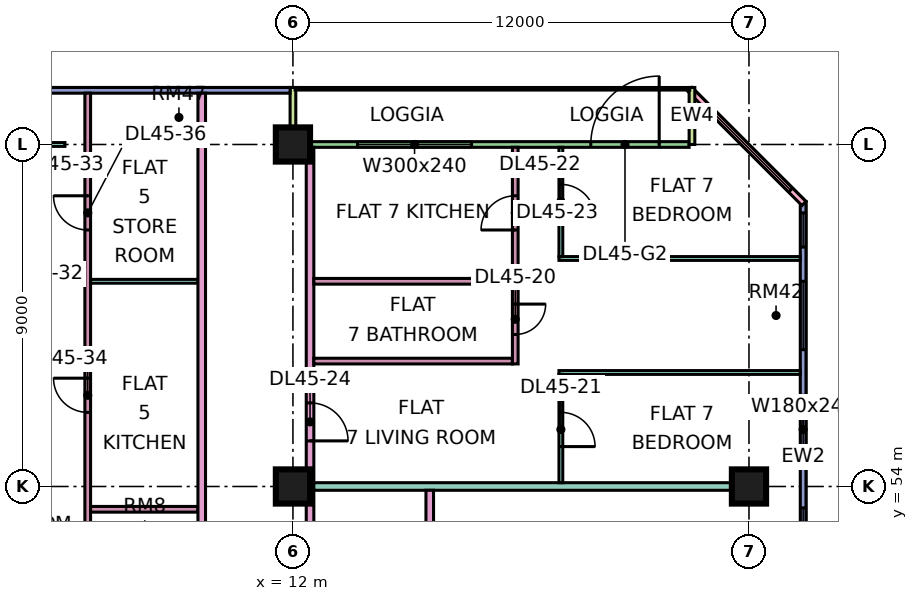
"""IFC4 building model, lengths in metres.
Left out: names, types, materials, properties, quantities, classifications, styles, units other than length and angle.
Written with IfcOpenShell. Run it as: python <this file> out.ifc"""

import sys

from ifc_helpers import new_model, si_unit, direction, frame, frame_2d, origin, origin_2d, place, context, subcontext, project, spatial, rectangle, extrude, element, fill, save


model = new_model("IFC4")
c1 = context("Model", 3, precision=1e-05, world=origin(), true_north=direction((0.0, 1.0)))
c2 = subcontext(c1, "Body", "Model", "MODEL_VIEW")
j1 = project(units=[si_unit("LENGTHUNIT", "METRE"), si_unit("PLANEANGLEUNIT", "RADIAN")], contexts=[c1])
p1 = place(None, origin())
s1 = spatial("IfcSite", under=j1, at=p1, CompositionType="ELEMENT")
p2 = place(p1, origin())
s2 = spatial("IfcBuilding", under=s1, at=p2, CompositionType="ELEMENT")
p3 = place(p2, frame((0.0, 0.0, 194.9)))
s3 = spatial("IfcBuildingStorey", under=s2, at=p3, CompositionType="ELEMENT", Elevation=194.9)
for number, where, z_axis, x_axis in (
    (1, (12.0, 54.0, 0.0), (0.0, 0.0, 1.0), (1.0, 0.0, 0.0)),
    (2, (12.0, 63.0, 0.0), (0.0, 0.0, 1.0), (1.0, 0.0, 0.0)),
    (3, (24.0, 54.0, 0.0), (0.0, 0.0, 1.0), (1.0, 0.0, 0.0)),
):
    element("IfcColumn", number, at=place(p3, frame(where, z_axis=z_axis, x_axis=x_axis)), inside=s3, PredefinedType="COLUMN", context=c2, shape_type="SweptSolid", body=[
        extrude(rectangle(XDim=0.9, YDim=0.9, at=origin_2d()), origin(), (0.0, 0.0, 1.0), 3.75),
    ])
p4 = place(p3, frame((25.425, 48.075, 0.0), z_axis=(0.0, 0.0, 1.0), x_axis=(0.0, 1.0, 0.0)))
e4 = element("IfcWall", 4, at=p4, inside=s3, PredefinedType="SOLIDWALL", context=c2, shape_type="SweptSolid", body=[
    extrude(rectangle(XDim=13.425, YDim=0.15, at=frame_2d((6.712, 0.0))), origin(), (0.0, 0.0, 1.0), 3.35),
])
p5 = place(p4, frame((0.562, 0.0, 0.45)))
e5 = element("IfcOpeningElement", 5, at=p5, cuts=e4, PredefinedType="OPENING", context=c2, shape_type="SweptSolid", body=[
    extrude(rectangle(XDim=4.8, YDim=2.4, at=frame_2d((2.4, 1.2))), frame((0.0, 0.085, 0.0), z_axis=(0.0, -1.0, 0.0), x_axis=(1.0, 0.0, 0.0)), (0.0, 0.0, 1.0), 0.17),
])
p6 = place(p4, frame((6.525, 0.0, 0.45)))
e6 = element("IfcOpeningElement", 6, at=p6, cuts=e4, PredefinedType="OPENING", context=c2, shape_type="SweptSolid", body=[
    extrude(rectangle(XDim=1.8, YDim=2.4, at=frame_2d((0.9, 1.2))), frame((0.0, 0.085, 0.0), z_axis=(0.0, -1.0, 0.0), x_axis=(1.0, 0.0, 0.0)), (0.0, 0.0, 1.0), 0.17),
])
p7 = place(p4, frame((9.525, 0.0, 0.45)))
e7 = element("IfcOpeningElement", 7, at=p7, cuts=e4, PredefinedType="OPENING", context=c2, shape_type="SweptSolid", body=[
    extrude(rectangle(XDim=1.8, YDim=2.4, at=frame_2d((0.9, 1.2))), frame((0.0, 0.085, 0.0), z_axis=(0.0, -1.0, 0.0), x_axis=(1.0, 0.0, 0.0)), (0.0, 0.0, 1.0), 0.17),
])
p8 = place(p4, frame((12.225, 0.0, 0.45)))
e8 = element("IfcOpeningElement", 8, at=p8, cuts=e4, PredefinedType="OPENING", context=c2, shape_type="SweptSolid", body=[
    extrude(rectangle(XDim=0.9, YDim=2.4, at=frame_2d((0.45, 1.2))), frame((0.0, 0.085, 0.0), z_axis=(0.0, -1.0, 0.0), x_axis=(1.0, 0.0, 0.0)), (0.0, 0.0, 1.0), 0.17),
])
p9 = place(p3, frame((25.447, 61.447, 0.0), z_axis=(0.0, 0.0, 1.0), x_axis=(-0.707106781187, 0.707106781187, 0.0)))
e9 = element("IfcWall", 9, at=p9, inside=s3, PredefinedType="SOLIDWALL", context=c2, shape_type="SweptSolid", body=[
    extrude(rectangle(XDim=4.243, YDim=0.15, at=frame_2d((2.121, 0.0))), origin(), (0.0, 0.0, 1.0), 3.35),
])
p10 = place(p9, frame((0.498, 0.0, 0.45)))
e10 = element("IfcOpeningElement", 10, at=p10, cuts=e9, PredefinedType="OPENING", context=c2, shape_type="SweptSolid", body=[
    extrude(rectangle(XDim=3.0, YDim=2.4, at=frame_2d((1.5, 1.2))), frame((0.0, 0.085, 0.0), z_axis=(0.0, -1.0, 0.0), x_axis=(1.0, 0.0, 0.0)), (0.0, 0.0, 1.0), 0.17),
])
p11 = place(p3, frame((22.425, 63.0, 0.0), z_axis=(0.0, 0.0, 1.0), x_axis=(-1.0, 0.0, 0.0)))
e11 = element("IfcWall", 11, at=p11, inside=s3, PredefinedType="SOLIDWALL", context=c2, shape_type="SweptSolid", body=[
    extrude(rectangle(XDim=10.35, YDim=0.15, at=frame_2d((5.175, 0.0))), origin(), (0.0, 0.0, 1.0), 3.35),
])
p12 = place(p11, frame((0.788, 0.0, 0.0)))
e12 = element("IfcOpeningElement", 12, at=p12, cuts=e11, PredefinedType="OPENING", context=c2, shape_type="SweptSolid", body=[
    extrude(rectangle(XDim=1.8, YDim=2.4, at=frame_2d((0.9, 1.2))), frame((0.0, 0.085, 0.0), z_axis=(0.0, -1.0, 0.0), x_axis=(1.0, 0.0, 0.0)), (0.0, 0.0, 1.0), 0.17),
])
p13 = place(p11, frame((5.725, 0.0, 0.45)))
e13 = element("IfcOpeningElement", 13, at=p13, cuts=e11, PredefinedType="OPENING", context=c2, shape_type="SweptSolid", body=[
    extrude(rectangle(XDim=3.0, YDim=2.4, at=frame_2d((1.5, 1.2))), frame((0.0, 0.085, 0.0), z_axis=(0.0, -1.0, 0.0), x_axis=(1.0, 0.0, 0.0)), (0.0, 0.0, 1.0), 0.17),
])
for number, where, z_axis, x_axis in (
    (14, (22.5, 64.5, 0.0), (0.0, 0.0, 1.0), (0.0, -1.0, 0.0)),
    (15, (12.0, 64.5, 0.0), (0.0, 0.0, 1.0), (0.0, -1.0, 0.0)),
):
    element("IfcWall", number, at=place(p3, frame(where, z_axis=z_axis, x_axis=x_axis)), inside=s3, PredefinedType="SOLIDWALL", context=c2, shape_type="SweptSolid", body=[
        extrude(rectangle(XDim=1.5, YDim=0.15, at=frame_2d((0.75, 0.0))), origin(), (0.0, 0.0, 1.0), 3.35),
    ])
p14 = place(p3, frame((11.925, 64.425, 0.0), z_axis=(0.0, 0.0, 1.0), x_axis=(-1.0, 0.0, 0.0)))
e16 = element("IfcWall", 16, at=p14, inside=s3, PredefinedType="SOLIDWALL", context=c2, shape_type="SweptSolid", body=[
    extrude(rectangle(XDim=10.425, YDim=0.15, at=frame_2d((5.212, 0.0))), origin(), (0.0, 0.0, 1.0), 3.35),
])
p15 = place(p14, frame((6.675, 0.0, 0.45)))
e17 = element("IfcOpeningElement", 17, at=p15, cuts=e16, PredefinedType="OPENING", context=c2, shape_type="SweptSolid", body=[
    extrude(rectangle(XDim=3.0, YDim=2.4, at=frame_2d((1.5, 1.2))), frame((0.0, 0.085, 0.0), z_axis=(0.0, -1.0, 0.0), x_axis=(1.0, 0.0, 0.0)), (0.0, 0.0, 1.0), 0.17),
])
p16 = place(p3, frame((5.45, 63.0, 0.0), z_axis=(0.0, 0.0, 1.0), x_axis=(1.0, 0.0, 0.0)))
e18 = element("IfcWall", 18, at=p16, inside=s3, PredefinedType="PARTITIONING", context=c2, shape_type="SweptSolid", body=[
    extrude(rectangle(XDim=0.55, YDim=0.1, at=frame_2d((0.275, 0.0))), origin(), (0.0, 0.0, 1.0), 3.35),
])
p17 = place(p3, frame((6.6, 51.225, 0.0), z_axis=(0.0, 0.0, 1.0), x_axis=(0.0, 1.0, 0.0)))
e19 = element("IfcWall", 19, at=p17, inside=s3, PredefinedType="PARTITIONING", context=c2, shape_type="SweptSolid", body=[
    extrude(rectangle(XDim=13.125, YDim=0.15, at=frame_2d((6.562, 0.0))), origin(), (0.0, 0.0, 1.0), 3.35),
])
p18 = place(p17, frame((4.725, 0.0, 0.0)))
e20 = element("IfcOpeningElement", 20, at=p18, cuts=e19, PredefinedType="OPENING", context=c2, shape_type="SweptSolid", body=[
    extrude(rectangle(XDim=0.9, YDim=2.1, at=frame_2d((0.45, 1.05))), frame((0.0, 0.085, 0.0), z_axis=(0.0, -1.0, 0.0), x_axis=(1.0, 0.0, 0.0)), (0.0, 0.0, 1.0), 0.17),
])
p19 = place(p17, frame((9.525, 0.0, 0.0)))
e21 = element("IfcOpeningElement", 21, at=p19, cuts=e19, PredefinedType="OPENING", context=c2, shape_type="SweptSolid", body=[
    extrude(rectangle(XDim=0.9, YDim=2.1, at=frame_2d((0.45, 1.05))), frame((0.0, 0.085, 0.0), z_axis=(0.0, -1.0, 0.0), x_axis=(1.0, 0.0, 0.0)), (0.0, 0.0, 1.0), 0.17),
])
p20 = place(p3, frame((6.675, 53.4, 0.0), z_axis=(0.0, 0.0, 1.0), x_axis=(1.0, 0.0, 0.0)))
e22 = element("IfcWall", 22, at=p20, inside=s3, PredefinedType="PARTITIONING", context=c2, shape_type="SweptSolid", body=[
    extrude(rectangle(XDim=2.825, YDim=0.15, at=frame_2d((1.413, 0.0))), origin(), (0.0, 0.0, 1.0), 3.35),
])
p21 = place(p3, frame((6.675, 59.4, 0.0), z_axis=(0.0, 0.0, 1.0), x_axis=(1.0, 0.0, 0.0)))
e23 = element("IfcWall", 23, at=p21, inside=s3, PredefinedType="PARTITIONING", context=c2, shape_type="SweptSolid", body=[
    extrude(rectangle(XDim=2.825, YDim=0.1, at=frame_2d((1.413, 0.0))), origin(), (0.0, 0.0, 1.0), 3.35),
])
p22 = place(p3, frame((9.6, 20.0, 0.0), z_axis=(0.0, 0.0, 1.0), x_axis=(0.0, 1.0, 0.0)))
e24 = element("IfcWall", 24, at=p22, inside=s3, PredefinedType="PARTITIONING", context=c2, shape_type="SweptSolid", body=[
    extrude(rectangle(XDim=44.35, YDim=0.2, at=frame_2d((22.175, 0.0))), origin(), (0.0, 0.0, 1.0), 3.35),
])
p23 = place(p22, frame((17.1, 0.0, 0.0)))
e25 = element("IfcOpeningElement", 25, at=p23, cuts=e24, PredefinedType="OPENING", context=c2, shape_type="SweptSolid", body=[
    extrude(rectangle(XDim=1.0, YDim=2.1, at=frame_2d((0.5, 1.05))), frame((0.0, 0.11, 0.0), z_axis=(0.0, -1.0, 0.0), x_axis=(1.0, 0.0, 0.0)), (0.0, 0.0, 1.0), 0.22),
])
p24 = place(p22, frame((29.1, 0.0, 0.0)))
e26 = element("IfcOpeningElement", 26, at=p24, cuts=e24, PredefinedType="OPENING", context=c2, shape_type="SweptSolid", body=[
    extrude(rectangle(XDim=1.0, YDim=2.1, at=frame_2d((0.5, 1.05))), frame((0.0, 0.11, 0.0), z_axis=(0.0, -1.0, 0.0), x_axis=(1.0, 0.0, 0.0)), (0.0, 0.0, 1.0), 0.22),
])
p25 = place(p22, frame((0.6, 0.0, 0.0)))
e27 = element("IfcOpeningElement", 27, at=p25, cuts=e24, PredefinedType="OPENING", context=c2, shape_type="SweptSolid", body=[
    extrude(rectangle(XDim=1.2, YDim=2.1, at=frame_2d((0.6, 1.05))), frame((0.0, 0.11, 0.0), z_axis=(0.0, -1.0, 0.0), x_axis=(1.0, 0.0, 0.0)), (0.0, 0.0, 1.0), 0.22),
])
p26 = place(p22, frame((4.35, 0.0, 0.0)))
e28 = element("IfcOpeningElement", 28, at=p26, cuts=e24, PredefinedType="OPENING", context=c2, shape_type="SweptSolid", body=[
    extrude(rectangle(XDim=1.0, YDim=2.1, at=frame_2d((0.5, 1.05))), frame((0.0, 0.11, 0.0), z_axis=(0.0, -1.0, 0.0), x_axis=(1.0, 0.0, 0.0)), (0.0, 0.0, 1.0), 0.22),
])
p27 = place(p3, frame((12.45, 20.0, 0.0), z_axis=(0.0, 0.0, 1.0), x_axis=(0.0, 1.0, 0.0)))
e29 = element("IfcWall", 29, at=p27, inside=s3, PredefinedType="PARTITIONING", context=c2, shape_type="SweptSolid", body=[
    extrude(rectangle(XDim=42.926, YDim=0.2, at=frame_2d((21.463, 0.0))), origin(), (0.0, 0.0, 1.0), 3.35),
])
p28 = place(p27, frame((7.15, 0.0, 0.0)))
e30 = element("IfcOpeningElement", 30, at=p28, cuts=e29, PredefinedType="OPENING", context=c2, shape_type="SweptSolid", body=[
    extrude(rectangle(XDim=1.6, YDim=2.1, at=frame_2d((0.8, 1.05))), frame((0.0, 0.11, 0.0), z_axis=(0.0, -1.0, 0.0), x_axis=(1.0, 0.0, 0.0)), (0.0, 0.0, 1.0), 0.22),
])
p29 = place(p27, frame((13.5, 0.0, 0.0)))
e31 = element("IfcOpeningElement", 31, at=p29, cuts=e29, PredefinedType="OPENING", context=c2, shape_type="SweptSolid", body=[
    extrude(rectangle(XDim=1.0, YDim=2.1, at=frame_2d((0.5, 1.05))), frame((0.0, 0.11, 0.0), z_axis=(0.0, -1.0, 0.0), x_axis=(1.0, 0.0, 0.0)), (0.0, 0.0, 1.0), 0.22),
])
p30 = place(p27, frame((17.2, 0.0, 0.0)))
e32 = element("IfcOpeningElement", 32, at=p30, cuts=e29, PredefinedType="OPENING", context=c2, shape_type="SweptSolid", body=[
    extrude(rectangle(XDim=1.0, YDim=2.1, at=frame_2d((0.5, 1.05))), frame((0.0, 0.11, 0.0), z_axis=(0.0, -1.0, 0.0), x_axis=(1.0, 0.0, 0.0)), (0.0, 0.0, 1.0), 0.22),
])
p31 = place(p27, frame((35.2, 0.0, 0.0)))
e33 = element("IfcOpeningElement", 33, at=p31, cuts=e29, PredefinedType="OPENING", context=c2, shape_type="SweptSolid", body=[
    extrude(rectangle(XDim=1.0, YDim=2.1, at=frame_2d((0.5, 1.05))), frame((0.0, 0.11, 0.0), z_axis=(0.0, -1.0, 0.0), x_axis=(1.0, 0.0, 0.0)), (0.0, 0.0, 1.0), 0.22),
])
p32 = place(p27, frame((1.15, 0.0, 0.0)))
e34 = element("IfcOpeningElement", 34, at=p32, cuts=e29, PredefinedType="OPENING", context=c2, shape_type="SweptSolid", body=[
    extrude(rectangle(XDim=1.8, YDim=2.1, at=frame_2d((0.9, 1.05))), frame((0.0, 0.11, 0.0), z_axis=(0.0, -1.0, 0.0), x_axis=(1.0, 0.0, 0.0)), (0.0, 0.0, 1.0), 0.22),
])
p33 = place(p27, frame((28.6, 0.0, 0.0)))
e35 = element("IfcOpeningElement", 35, at=p33, cuts=e29, PredefinedType="OPENING", context=c2, shape_type="SweptSolid", body=[
    extrude(rectangle(XDim=1.8, YDim=2.1, at=frame_2d((0.9, 1.05))), frame((0.0, 0.11, 0.0), z_axis=(0.0, -1.0, 0.0), x_axis=(1.0, 0.0, 0.0)), (0.0, 0.0, 1.0), 0.22),
])
p34 = place(p3, frame((12.55, 54.0, 0.0), z_axis=(0.0, 0.0, 1.0), x_axis=(1.0, 0.0, 0.0)))
e36 = element("IfcWall", 36, at=p34, inside=s3, PredefinedType="PARTITIONING", context=c2, shape_type="SweptSolid", body=[
    extrude(rectangle(XDim=11.45, YDim=0.2, at=frame_2d((5.725, 0.0))), origin(), (0.0, 0.0, 1.0), 3.35),
])
for number, where, z_axis, x_axis in (
    (37, (12.55, 57.3, 0.0), (0.0, 0.0, 1.0), (1.0, 0.0, 0.0)),
    (38, (12.55, 59.4, 0.0), (0.0, 0.0, 1.0), (1.0, 0.0, 0.0)),
):
    element("IfcWall", number, at=place(p3, frame(where, z_axis=z_axis, x_axis=x_axis)), inside=s3, PredefinedType="PARTITIONING", context=c2, shape_type="SweptSolid", body=[
        extrude(rectangle(XDim=5.225, YDim=0.15, at=frame_2d((2.612, 0.0))), origin(), (0.0, 0.0, 1.0), 3.35),
    ])
p35 = place(p3, frame((15.6, 51.225, 0.0), z_axis=(0.0, 0.0, 1.0), x_axis=(0.0, 1.0, 0.0)))
e39 = element("IfcWall", 39, at=p35, inside=s3, PredefinedType="PARTITIONING", context=c2, shape_type="SweptSolid", body=[
    extrude(rectangle(XDim=2.675, YDim=0.2, at=frame_2d((1.337, 0.0))), origin(), (0.0, 0.0, 1.0), 3.35),
])
p36 = place(p3, frame((17.85, 57.225, 0.0), z_axis=(0.0, 0.0, 1.0), x_axis=(0.0, 1.0, 0.0)))
e40 = element("IfcWall", 40, at=p36, inside=s3, PredefinedType="PARTITIONING", context=c2, shape_type="SweptSolid", body=[
    extrude(rectangle(XDim=5.701, YDim=0.15, at=frame_2d((2.851, 0.0))), origin(), (0.0, 0.0, 1.0), 3.35),
])
p37 = place(p36, frame((0.775, 0.0, 0.0)))
e41 = element("IfcOpeningElement", 41, at=p37, cuts=e40, PredefinedType="OPENING", context=c2, shape_type="SweptSolid", body=[
    extrude(rectangle(XDim=0.8, YDim=2.1, at=frame_2d((0.4, 1.05))), frame((0.0, 0.085, 0.0), z_axis=(0.0, -1.0, 0.0), x_axis=(1.0, 0.0, 0.0)), (0.0, 0.0, 1.0), 0.17),
])
p38 = place(p36, frame((3.525, 0.0, 0.0)))
e42 = element("IfcOpeningElement", 42, at=p38, cuts=e40, PredefinedType="OPENING", context=c2, shape_type="SweptSolid", body=[
    extrude(rectangle(XDim=0.9, YDim=2.1, at=frame_2d((0.45, 1.05))), frame((0.0, 0.085, 0.0), z_axis=(0.0, -1.0, 0.0), x_axis=(1.0, 0.0, 0.0)), (0.0, 0.0, 1.0), 0.17),
])
for number, where, z_axis, x_axis in (
    (43, (19.0, 57.0, 0.0), (0.0, 0.0, 1.0), (1.0, 0.0, 0.0)),
    (44, (19.0, 60.0, 0.0), (0.0, 0.0, 1.0), (1.0, 0.0, 0.0)),
):
    element("IfcWall", number, at=place(p3, frame(where, z_axis=z_axis, x_axis=x_axis)), inside=s3, PredefinedType="PARTITIONING", context=c2, shape_type="SweptSolid", body=[
        extrude(rectangle(XDim=6.35, YDim=0.1, at=frame_2d((3.175, 0.0))), origin(), (0.0, 0.0, 1.0), 3.35),
    ])
p39 = place(p3, frame((19.05, 54.1, 0.0), z_axis=(0.0, 0.0, 1.0), x_axis=(0.0, 1.0, 0.0)))
e45 = element("IfcWall", 45, at=p39, inside=s3, PredefinedType="PARTITIONING", context=c2, shape_type="SweptSolid", body=[
    extrude(rectangle(XDim=2.85, YDim=0.1, at=frame_2d((1.425, 0.0))), origin(), (0.0, 0.0, 1.0), 3.35),
])
p40 = place(p39, frame((0.95, 0.0, 0.0)))
e46 = element("IfcOpeningElement", 46, at=p40, cuts=e45, PredefinedType="OPENING", context=c2, shape_type="SweptSolid", body=[
    extrude(rectangle(XDim=0.9, YDim=2.1, at=frame_2d((0.45, 1.05))), frame((0.0, 0.06, 0.0), z_axis=(0.0, -1.0, 0.0), x_axis=(1.0, 0.0, 0.0)), (0.0, 0.0, 1.0), 0.12),
])
p41 = place(p3, frame((19.05, 60.05, 0.0), z_axis=(0.0, 0.0, 1.0), x_axis=(0.0, 1.0, 0.0)))
e47 = element("IfcWall", 47, at=p41, inside=s3, PredefinedType="PARTITIONING", context=c2, shape_type="SweptSolid", body=[
    extrude(rectangle(XDim=2.876, YDim=0.1, at=frame_2d((1.438, 0.0))), origin(), (0.0, 0.0, 1.0), 3.35),
])
p42 = place(p41, frame((1.0, 0.0, 0.0)))
e48 = element("IfcOpeningElement", 48, at=p42, cuts=e47, PredefinedType="OPENING", context=c2, shape_type="SweptSolid", body=[
    extrude(rectangle(XDim=0.9, YDim=2.1, at=frame_2d((0.45, 1.05))), frame((0.0, 0.06, 0.0), z_axis=(0.0, -1.0, 0.0), x_axis=(1.0, 0.0, 0.0)), (0.0, 0.0, 1.0), 0.12),
])
p43 = place(p5, origin())
e49 = element("IfcWindow", 49, at=p43, inside=s3, PartitioningType="SINGLE_PANEL", PredefinedType="WINDOW", context=c2, shape_type="SweptSolid", body=[
    extrude(rectangle(XDim=4.8, YDim=2.4, at=frame_2d((2.4, 1.2))), frame((0.0, 0.03, 0.0), z_axis=(0.0, -1.0, 0.0), x_axis=(1.0, 0.0, 0.0)), (0.0, 0.0, 1.0), 0.06),
])
fill(e5, e49)
p44 = place(p6, origin())
e50 = element("IfcWindow", 50, at=p44, inside=s3, PartitioningType="SINGLE_PANEL", PredefinedType="WINDOW", context=c2, shape_type="SweptSolid", body=[
    extrude(rectangle(XDim=1.8, YDim=2.4, at=frame_2d((0.9, 1.2))), frame((0.0, 0.03, 0.0), z_axis=(0.0, -1.0, 0.0), x_axis=(1.0, 0.0, 0.0)), (0.0, 0.0, 1.0), 0.06),
])
fill(e6, e50)
p45 = place(p7, origin())
e51 = element("IfcWindow", 51, at=p45, inside=s3, PartitioningType="SINGLE_PANEL", PredefinedType="WINDOW", context=c2, shape_type="SweptSolid", body=[
    extrude(rectangle(XDim=1.8, YDim=2.4, at=frame_2d((0.9, 1.2))), frame((0.0, 0.03, 0.0), z_axis=(0.0, -1.0, 0.0), x_axis=(1.0, 0.0, 0.0)), (0.0, 0.0, 1.0), 0.06),
])
fill(e7, e51)
p46 = place(p8, origin())
e52 = element("IfcWindow", 52, at=p46, inside=s3, PartitioningType="SINGLE_PANEL", PredefinedType="WINDOW", context=c2, shape_type="SweptSolid", body=[
    extrude(rectangle(XDim=0.9, YDim=2.4, at=frame_2d((0.45, 1.2))), frame((0.0, 0.03, 0.0), z_axis=(0.0, -1.0, 0.0), x_axis=(1.0, 0.0, 0.0)), (0.0, 0.0, 1.0), 0.06),
])
fill(e8, e52)
p47 = place(p10, origin())
e53 = element("IfcWindow", 53, at=p47, inside=s3, PartitioningType="SINGLE_PANEL", PredefinedType="WINDOW", context=c2, shape_type="SweptSolid", body=[
    extrude(rectangle(XDim=3.0, YDim=2.4, at=frame_2d((1.5, 1.2))), frame((0.0, 0.03, 0.0), z_axis=(0.0, -1.0, 0.0), x_axis=(1.0, 0.0, 0.0)), (0.0, 0.0, 1.0), 0.06),
])
fill(e10, e53)
p48 = place(p12, frame((1.8, 0.0, 0.0), z_axis=(0.0, 0.0, 1.0), x_axis=(-1.0, 0.0, 0.0)))
e54 = element("IfcDoor", 54, at=p48, inside=s3, OperationType="DOUBLE_DOOR_SINGLE_SWING", PredefinedType="DOOR", context=c2, shape_type="SweptSolid", body=[
    extrude(rectangle(XDim=1.8, YDim=2.4, at=frame_2d((0.9, 1.2))), frame((0.0, 0.025, 0.0), z_axis=(0.0, -1.0, 0.0), x_axis=(1.0, 0.0, 0.0)), (0.0, 0.0, 1.0), 0.05),
])
fill(e12, e54)
p49 = place(p13, origin())
e55 = element("IfcWindow", 55, at=p49, inside=s3, PartitioningType="SINGLE_PANEL", PredefinedType="WINDOW", context=c2, shape_type="SweptSolid", body=[
    extrude(rectangle(XDim=3.0, YDim=2.4, at=frame_2d((1.5, 1.2))), frame((0.0, 0.03, 0.0), z_axis=(0.0, -1.0, 0.0), x_axis=(1.0, 0.0, 0.0)), (0.0, 0.0, 1.0), 0.06),
])
fill(e13, e55)
p50 = place(p37, origin())
e56 = element("IfcDoor", 56, at=p50, inside=s3, OperationType="SINGLE_SWING_RIGHT", PredefinedType="DOOR", context=c2, shape_type="SweptSolid", body=[
    extrude(rectangle(XDim=0.8, YDim=2.1, at=frame_2d((0.4, 1.05))), frame((0.0, 0.025, 0.0), z_axis=(0.0, -1.0, 0.0), x_axis=(1.0, 0.0, 0.0)), (0.0, 0.0, 1.0), 0.05),
])
fill(e41, e56)
p51 = place(p40, frame((0.9, 0.0, 0.0), z_axis=(0.0, 0.0, 1.0), x_axis=(-1.0, 0.0, 0.0)))
e57 = element("IfcDoor", 57, at=p51, inside=s3, OperationType="SINGLE_SWING_LEFT", PredefinedType="DOOR", context=c2, shape_type="SweptSolid", body=[
    extrude(rectangle(XDim=0.9, YDim=2.1, at=frame_2d((0.45, 1.05))), frame((0.0, 0.025, 0.0), z_axis=(0.0, -1.0, 0.0), x_axis=(1.0, 0.0, 0.0)), (0.0, 0.0, 1.0), 0.05),
])
fill(e46, e57)
p52 = place(p42, frame((0.9, 0.0, 0.0), z_axis=(0.0, 0.0, 1.0), x_axis=(-1.0, 0.0, 0.0)))
e58 = element("IfcDoor", 58, at=p52, inside=s3, OperationType="SINGLE_SWING_LEFT", PredefinedType="DOOR", context=c2, shape_type="SweptSolid", body=[
    extrude(rectangle(XDim=0.9, YDim=2.1, at=frame_2d((0.45, 1.05))), frame((0.0, 0.025, 0.0), z_axis=(0.0, -1.0, 0.0), x_axis=(1.0, 0.0, 0.0)), (0.0, 0.0, 1.0), 0.05),
])
fill(e48, e58)
p53 = place(p38, origin())
e59 = element("IfcDoor", 59, at=p53, inside=s3, OperationType="SINGLE_SWING_LEFT", PredefinedType="DOOR", context=c2, shape_type="SweptSolid", body=[
    extrude(rectangle(XDim=0.9, YDim=2.1, at=frame_2d((0.45, 1.05))), frame((0.0, 0.025, 0.0), z_axis=(0.0, -1.0, 0.0), x_axis=(1.0, 0.0, 0.0)), (0.0, 0.0, 1.0), 0.05),
])
fill(e42, e59)
p54 = place(p31, frame((1.0, 0.0, 0.0), z_axis=(0.0, 0.0, 1.0), x_axis=(-1.0, 0.0, 0.0)))
e60 = element("IfcDoor", 60, at=p54, inside=s3, OperationType="SINGLE_SWING_LEFT", PredefinedType="DOOR", context=c2, shape_type="SweptSolid", body=[
    extrude(rectangle(XDim=1.0, YDim=2.1, at=frame_2d((0.5, 1.05))), frame((0.0, 0.025, 0.0), z_axis=(0.0, -1.0, 0.0), x_axis=(1.0, 0.0, 0.0)), (0.0, 0.0, 1.0), 0.05),
])
fill(e33, e60)
p55 = place(p18, frame((0.9, 0.0, 0.0), z_axis=(0.0, 0.0, 1.0), x_axis=(-1.0, 0.0, 0.0)))
e61 = element("IfcDoor", 61, at=p55, inside=s3, OperationType="SINGLE_SWING_RIGHT", PredefinedType="DOOR", context=c2, shape_type="SweptSolid", body=[
    extrude(rectangle(XDim=0.9, YDim=2.1, at=frame_2d((0.45, 1.05))), frame((0.0, 0.025, 0.0), z_axis=(0.0, -1.0, 0.0), x_axis=(1.0, 0.0, 0.0)), (0.0, 0.0, 1.0), 0.05),
])
fill(e20, e61)
p56 = place(p19, frame((0.9, 0.0, 0.0), z_axis=(0.0, 0.0, 1.0), x_axis=(-1.0, 0.0, 0.0)))
e62 = element("IfcDoor", 62, at=p56, inside=s3, OperationType="SINGLE_SWING_RIGHT", PredefinedType="DOOR", context=c2, shape_type="SweptSolid", body=[
    extrude(rectangle(XDim=0.9, YDim=2.1, at=frame_2d((0.45, 1.05))), frame((0.0, 0.025, 0.0), z_axis=(0.0, -1.0, 0.0), x_axis=(1.0, 0.0, 0.0)), (0.0, 0.0, 1.0), 0.05),
])
fill(e21, e62)
save(model, sys.argv[1])
